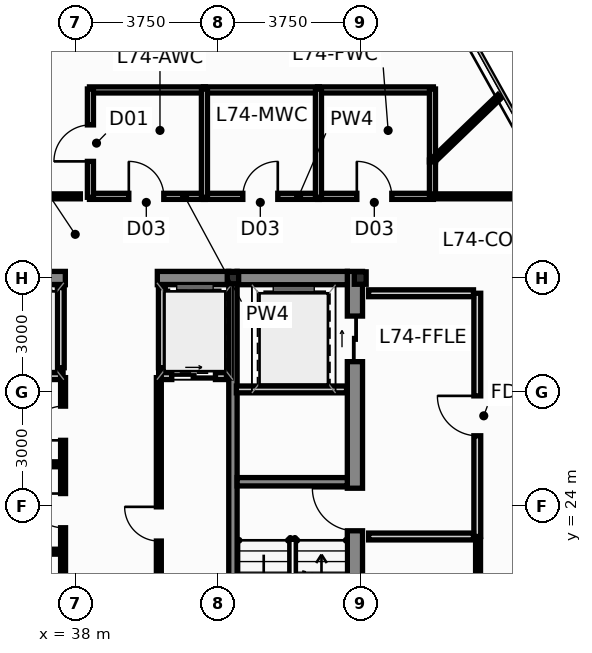
"""IFC4 building model, lengths in metres.
Left out: names, types, materials, properties, quantities, classifications, styles, units other than length and angle.
Written with IfcOpenShell. Run it as: python <this file> out.ifc"""

import sys

from ifc_helpers import new_model, si_unit, direction, frame, frame_2d, origin, origin_2d, place, context, subcontext, project, spatial, rectangle, hollow_rectangle, i_section, extrude, source, transform, mapped, element, fill, save


model = new_model("IFC4")
c1 = context("Model", 3, precision=1e-05, world=origin(), true_north=direction((0.0, 1.0)))
c2 = subcontext(c1, "Body", "Model", "MODEL_VIEW")
j1 = project(units=[si_unit("LENGTHUNIT", "METRE"), si_unit("PLANEANGLEUNIT", "RADIAN")], contexts=[c1])
p1 = place(None, origin())
s1 = spatial("IfcSite", under=j1, at=p1, CompositionType="ELEMENT")
p2 = place(p1, origin())
s2 = spatial("IfcBuilding", under=s1, at=p2, CompositionType="ELEMENT")
p3 = place(p2, frame((0.0, 0.0, 280.95)))
s3 = spatial("IfcBuildingStorey", under=s2, at=p3, CompositionType="ELEMENT", Elevation=280.95)
m1 = source(origin(), c2, "Body", "SweptSolid", [
    extrude(i_section(OverallWidth=0.311, OverallDepth=0.327, WebThickness=0.016, FlangeThickness=0.025, at=origin_2d()), origin(), (0.0, 0.0, 1.0), 3.65),
])
p4 = place(p3, frame((45.5, 30.0, 0.0), z_axis=(0.0, 0.0, 1.0), x_axis=(1.0, 0.0, 0.0)))
e1 = element("IfcColumn", 1, at=p4, inside=s3, PredefinedType="COLUMN", context=c2, shape_type="MappedRepresentation", body=[
    mapped(m1, transform((0.0, 0.0, 0.0), scale=1.0)),
])
m2 = source(origin(), c2, "Body", "SweptSolid", [
    extrude(hollow_rectangle(XDim=0.3, YDim=0.3, WallThickness=0.012, at=origin_2d()), origin(), (0.0, 0.0, 1.0), 3.65),
])
p5 = place(p3, frame((42.15, 30.0, 0.0), z_axis=(0.0, 0.0, 1.0), x_axis=(1.0, 0.0, 0.0)))
e2 = element("IfcColumn", 2, at=p5, inside=s3, PredefinedType="COLUMN", context=c2, shape_type="MappedRepresentation", body=[
    mapped(m2, transform((0.0, 0.0, 0.0), scale=1.0)),
])
p6 = place(p3, frame((45.36, 17.05, 0.0), z_axis=(0.0, 0.0, 1.0), x_axis=(0.0, 1.0, 0.0)))
e3 = element("IfcWall", 3, at=p6, inside=s3, PredefinedType="SHEAR", context=c2, shape_type="SweptSolid", body=[
    extrude(rectangle(XDim=13.125, YDim=0.4, at=frame_2d((6.562, 0.0))), origin(), (0.0, 0.0, 1.0), 3.65),
])
p7 = place(p6, frame((6.3, 0.0, 0.0)))
e4 = element("IfcOpeningElement", 4, at=p7, cuts=e3, PredefinedType="OPENING", context=c2, shape_type="SweptSolid", body=[
    extrude(rectangle(XDim=1.12, YDim=2.15, at=frame_2d((0.56, 1.075))), frame((0.0, 0.212, 0.0), z_axis=(0.0, -1.0, 0.0), x_axis=(1.0, 0.0, 0.0)), (0.0, 0.0, 1.0), 0.424),
])
p8 = place(p6, frame((10.75, 0.0, 0.0)))
e5 = element("IfcOpeningElement", 5, at=p8, cuts=e3, PredefinedType="OPENING", context=c2, shape_type="SweptSolid", body=[
    extrude(rectangle(XDim=1.2, YDim=2.2, at=frame_2d((0.6, 1.1))), frame((0.0, 0.212, 0.0), z_axis=(0.0, -1.0, 0.0), x_axis=(1.0, 0.0, 0.0)), (0.0, 0.0, 1.0), 0.424),
])
p9 = place(p3, frame((33.96, 30.0, 0.0), z_axis=(0.0, 0.0, 1.0), x_axis=(1.0, 0.0, 0.0)))
e6 = element("IfcWall", 6, at=p9, inside=s3, PredefinedType="SHEAR", context=c2, shape_type="SweptSolid", body=[
    extrude(rectangle(XDim=3.78, YDim=0.35, at=frame_2d((1.89, 0.0))), origin(), (0.0, 0.0, 1.0), 3.65),
])
p10 = place(p3, frame((40.16, 30.0, 0.0), z_axis=(0.0, 0.0, 1.0), x_axis=(1.0, 0.0, 0.0)))
e7 = element("IfcWall", 7, at=p10, inside=s3, PredefinedType="SHEAR", context=c2, shape_type="SweptSolid", body=[
    extrude(rectangle(XDim=1.88, YDim=0.35, at=frame_2d((0.94, 0.0))), origin(), (0.0, 0.0, 1.0), 3.65),
])
p11 = place(p3, frame((42.26, 30.0, 0.0), z_axis=(0.0, 0.0, 1.0), x_axis=(1.0, 0.0, 0.0)))
e8 = element("IfcWall", 8, at=p11, inside=s3, PredefinedType="SHEAR", context=c2, shape_type="SweptSolid", body=[
    extrude(rectangle(XDim=2.9, YDim=0.35, at=frame_2d((1.45, 0.0))), origin(), (0.0, 0.0, 1.0), 3.65),
])
p12 = place(p3, frame((42.15, 17.05, 0.0), z_axis=(0.0, 0.0, 1.0), x_axis=(0.0, 1.0, 0.0)))
e9 = element("IfcWall", 9, at=p12, inside=s3, PredefinedType="SHEAR", context=c2, shape_type="SweptSolid", body=[
    extrude(rectangle(XDim=13.125, YDim=0.22, at=frame_2d((6.562, 0.0))), origin(), (0.0, 0.0, 1.0), 3.65),
])
p13 = place(p3, frame((42.26, 24.64, 0.0), z_axis=(0.0, 0.0, 1.0), x_axis=(1.0, 0.0, 0.0)))
e10 = element("IfcWall", 10, at=p13, inside=s3, PredefinedType="SHEAR", context=c2, shape_type="SweptSolid", body=[
    extrude(rectangle(XDim=2.9, YDim=0.22, at=frame_2d((1.45, 0.0))), origin(), (0.0, 0.0, 1.0), 3.65),
])
p14 = place(p3, frame((34.02, 27.42, 0.0), z_axis=(0.0, 0.0, 1.0), x_axis=(1.0, 0.0, 0.0)))
e11 = element("IfcWall", 11, at=p14, inside=s3, PredefinedType="PARTITIONING", context=c2, shape_type="SweptSolid", body=[
    extrude(rectangle(XDim=3.66, YDim=0.18, at=frame_2d((1.83, 0.0))), origin(), (0.0, 0.0, 1.0), 3.25),
])
p15 = place(p14, frame((0.3, 0.0, 0.0)))
e12 = element("IfcOpeningElement", 12, at=p15, cuts=e11, PredefinedType="OPENING", context=c2, shape_type="SweptSolid", body=[
    extrude(rectangle(XDim=1.15, YDim=2.2, at=frame_2d((0.575, 1.1))), frame((0.0, 0.102, 0.0), z_axis=(0.0, -1.0, 0.0), x_axis=(1.0, 0.0, 0.0)), (0.0, 0.0, 1.0), 0.204),
])
p16 = place(p14, frame((2.1, 0.0, 0.0)))
e13 = element("IfcOpeningElement", 13, at=p16, cuts=e11, PredefinedType="OPENING", context=c2, shape_type="SweptSolid", body=[
    extrude(rectangle(XDim=1.15, YDim=2.2, at=frame_2d((0.575, 1.1))), frame((0.0, 0.102, 0.0), z_axis=(0.0, -1.0, 0.0), x_axis=(1.0, 0.0, 0.0)), (0.0, 0.0, 1.0), 0.204),
])
p17 = place(p3, frame((40.22, 27.42, 0.0), z_axis=(0.0, 0.0, 1.0), x_axis=(1.0, 0.0, 0.0)))
e14 = element("IfcWall", 14, at=p17, inside=s3, PredefinedType="PARTITIONING", context=c2, shape_type="SweptSolid", body=[
    extrude(rectangle(XDim=1.76, YDim=0.18, at=frame_2d((0.88, 0.0))), origin(), (0.0, 0.0, 1.0), 3.25),
])
p18 = place(p17, frame((0.32, 0.0, 0.0)))
e15 = element("IfcOpeningElement", 15, at=p18, cuts=e14, PredefinedType="OPENING", context=c2, shape_type="SweptSolid", body=[
    extrude(rectangle(XDim=1.15, YDim=2.2, at=frame_2d((0.575, 1.1))), frame((0.0, 0.102, 0.0), z_axis=(0.0, -1.0, 0.0), x_axis=(1.0, 0.0, 0.0)), (0.0, 0.0, 1.0), 0.204),
])
for number, where, z_axis, x_axis in (
    (16, (37.62, 27.64, 0.0), (0.0, 0.0, 1.0), (0.0, 1.0, 0.0)),
    (17, (40.28, 27.64, 0.0), (0.0, 0.0, 1.0), (0.0, 1.0, 0.0)),
):
    element("IfcWall", number, at=place(p3, frame(where, z_axis=z_axis, x_axis=x_axis)), inside=s3, PredefinedType="PARTITIONING", context=c2, shape_type="SweptSolid", body=[
        extrude(rectangle(XDim=2.11, YDim=0.18, at=frame_2d((1.055, 0.0))), origin(), (0.0, 0.0, 1.0), 3.25),
    ])
p19 = place(p3, frame((48.58, 23.2, 0.0), z_axis=(0.0, 0.0, 1.0), x_axis=(0.0, 1.0, 0.0)))
e18 = element("IfcWall", 18, at=p19, inside=s3, PredefinedType="PARTITIONING", context=c2, shape_type="SweptSolid", body=[
    extrude(rectangle(XDim=6.4, YDim=0.18, at=frame_2d((3.2, 0.0))), origin(), (0.0, 0.0, 1.0), 2.979),
])
p20 = place(p19, frame((2.65, 0.0, 0.0)))
e19 = element("IfcOpeningElement", 19, at=p20, cuts=e18, PredefinedType="OPENING", context=c2, shape_type="SweptSolid", body=[
    extrude(rectangle(XDim=1.05, YDim=2.15, at=frame_2d((0.525, 1.075))), frame((0.0, 0.102, 0.0), z_axis=(0.0, -1.0, 0.0), x_axis=(1.0, 0.0, 0.0)), (0.0, 0.0, 1.0), 0.204),
])
for number, where, z_axis, x_axis in (
    (20, (45.72, 23.2, 0.0), (0.0, 0.0, 1.0), (1.0, 0.0, 0.0)),
    (21, (45.72, 29.6, 0.0), (0.0, 0.0, 1.0), (1.0, 0.0, 0.0)),
):
    element("IfcWall", number, at=place(p3, frame(where, z_axis=z_axis, x_axis=x_axis)), inside=s3, PredefinedType="PARTITIONING", context=c2, shape_type="SweptSolid", body=[
        extrude(rectangle(XDim=2.76, YDim=0.18, at=frame_2d((1.38, 0.0))), origin(), (0.0, 0.0, 1.0), 3.25),
    ])
p21 = place(p3, frame((42.24, 27.07, 0.0), z_axis=(0.0, 0.0, 1.0), x_axis=(1.0, 0.0, 0.0)))
e22 = element("IfcWall", 22, at=p21, inside=s3, PredefinedType="PARTITIONING", context=c2, shape_type="SweptSolid", body=[
    extrude(rectangle(XDim=2.9, YDim=0.18, at=frame_2d((1.45, 0.0))), origin(), (0.0, 0.0, 1.0), 3.25),
])
for number, where, z_axis, x_axis in (
    (23, (34.02, 22.8, 0.0), (0.0, 0.0, 1.0), (1.0, 0.0, 0.0)),
    (24, (34.02, 25.1, 0.0), (0.0, 0.0, 1.0), (1.0, 0.0, 0.0)),
):
    element("IfcWall", number, at=place(p3, frame(where, z_axis=z_axis, x_axis=x_axis)), inside=s3, PredefinedType="PARTITIONING", context=c2, shape_type="SweptSolid", body=[
        extrude(rectangle(XDim=3.58, YDim=0.13, at=frame_2d((1.79, 0.0))), origin(), (0.0, 0.0, 1.0), 3.25),
    ])
p22 = place(p3, frame((37.68, 20.48, 0.0), z_axis=(0.0, 0.0, 1.0), x_axis=(0.0, 1.0, 0.0)))
e25 = element("IfcWall", 25, at=p22, inside=s3, PredefinedType="PARTITIONING", context=c2, shape_type="SweptSolid", body=[
    extrude(rectangle(XDim=6.9, YDim=0.13, at=frame_2d((3.45, 0.0))), origin(), (0.0, 0.0, 1.0), 3.25),
])
p23 = place(p22, frame((0.65, 0.0, 0.0)))
e26 = element("IfcOpeningElement", 26, at=p23, cuts=e25, PredefinedType="OPENING", context=c2, shape_type="SweptSolid", body=[
    extrude(rectangle(XDim=0.9, YDim=2.1, at=frame_2d((0.45, 1.05))), frame((0.0, 0.077, 0.0), z_axis=(0.0, -1.0, 0.0), x_axis=(1.0, 0.0, 0.0)), (0.0, 0.0, 1.0), 0.154),
])
p24 = place(p22, frame((2.95, 0.0, 0.0)))
e27 = element("IfcOpeningElement", 27, at=p24, cuts=e25, PredefinedType="OPENING", context=c2, shape_type="SweptSolid", body=[
    extrude(rectangle(XDim=0.9, YDim=2.1, at=frame_2d((0.45, 1.05))), frame((0.0, 0.077, 0.0), z_axis=(0.0, -1.0, 0.0), x_axis=(1.0, 0.0, 0.0)), (0.0, 0.0, 1.0), 0.154),
])
p25 = place(p22, frame((5.25, 0.0, 0.0)))
e28 = element("IfcOpeningElement", 28, at=p25, cuts=e25, PredefinedType="OPENING", context=c2, shape_type="SweptSolid", body=[
    extrude(rectangle(XDim=0.9, YDim=2.1, at=frame_2d((0.45, 1.05))), frame((0.0, 0.077, 0.0), z_axis=(0.0, -1.0, 0.0), x_axis=(1.0, 0.0, 0.0)), (0.0, 0.0, 1.0), 0.154),
])
p26 = place(p3, frame((40.2, 20.48, 0.0), z_axis=(0.0, 0.0, 1.0), x_axis=(0.0, 1.0, 0.0)))
e29 = element("IfcWall", 29, at=p26, inside=s3, PredefinedType="PARTITIONING", context=c2, shape_type="SweptSolid", body=[
    extrude(rectangle(XDim=6.9, YDim=0.13, at=frame_2d((3.45, 0.0))), origin(), (0.0, 0.0, 1.0), 3.25),
])
p27 = place(p26, frame((2.6, 0.0, 0.0)))
e30 = element("IfcOpeningElement", 30, at=p27, cuts=e29, PredefinedType="OPENING", context=c2, shape_type="SweptSolid", body=[
    extrude(rectangle(XDim=0.9, YDim=2.1, at=frame_2d((0.45, 1.05))), frame((0.0, 0.077, 0.0), z_axis=(0.0, -1.0, 0.0), x_axis=(1.0, 0.0, 0.0)), (0.0, 0.0, 1.0), 0.154),
])
p28 = place(p3, frame((38.375, 32.15, 0.0), z_axis=(0.0, 0.0, 1.0), x_axis=(1.0, 0.0, 0.0)))
e31 = element("IfcWall", 31, at=p28, inside=s3, PredefinedType="PLUMBINGWALL", context=c2, shape_type="SweptSolid", body=[
    extrude(rectangle(XDim=3.05, YDim=0.16, at=frame_2d((1.525, 0.0))), origin(), (0.0, 0.0, 1.0), 3.25),
])
p29 = place(p28, frame((1.035, 0.0, 0.0)))
e32 = element("IfcOpeningElement", 32, at=p29, cuts=e31, PredefinedType="OPENING", context=c2, shape_type="SweptSolid", body=[
    extrude(rectangle(XDim=0.92, YDim=2.1, at=frame_2d((0.46, 1.05))), frame((0.0, 0.092, 0.0), z_axis=(0.0, -1.0, 0.0), x_axis=(1.0, 0.0, 0.0)), (0.0, 0.0, 1.0), 0.184),
])
p30 = place(p3, frame((41.375, 32.15, 0.0), z_axis=(0.0, 0.0, 1.0), x_axis=(1.0, 0.0, 0.0)))
e33 = element("IfcWall", 33, at=p30, inside=s3, PredefinedType="PLUMBINGWALL", context=c2, shape_type="SweptSolid", body=[
    extrude(rectangle(XDim=3.05, YDim=0.16, at=frame_2d((1.525, 0.0))), origin(), (0.0, 0.0, 1.0), 3.25),
])
p31 = place(p30, frame((1.035, 0.0, 0.0)))
e34 = element("IfcOpeningElement", 34, at=p31, cuts=e33, PredefinedType="OPENING", context=c2, shape_type="SweptSolid", body=[
    extrude(rectangle(XDim=0.92, YDim=2.1, at=frame_2d((0.46, 1.05))), frame((0.0, 0.092, 0.0), z_axis=(0.0, -1.0, 0.0), x_axis=(1.0, 0.0, 0.0)), (0.0, 0.0, 1.0), 0.184),
])
p32 = place(p3, frame((44.375, 32.15, 0.0), z_axis=(0.0, 0.0, 1.0), x_axis=(1.0, 0.0, 0.0)))
e35 = element("IfcWall", 35, at=p32, inside=s3, PredefinedType="PLUMBINGWALL", context=c2, shape_type="SweptSolid", body=[
    extrude(rectangle(XDim=3.05, YDim=0.16, at=frame_2d((1.525, 0.0))), origin(), (0.0, 0.0, 1.0), 3.25),
])
p33 = place(p32, frame((1.035, 0.0, 0.0)))
e36 = element("IfcOpeningElement", 36, at=p33, cuts=e35, PredefinedType="OPENING", context=c2, shape_type="SweptSolid", body=[
    extrude(rectangle(XDim=0.92, YDim=2.1, at=frame_2d((0.46, 1.05))), frame((0.0, 0.092, 0.0), z_axis=(0.0, -1.0, 0.0), x_axis=(1.0, 0.0, 0.0)), (0.0, 0.0, 1.0), 0.184),
])
for number, where, z_axis, x_axis in (
    (37, (38.375, 34.95, 0.0), (0.0, 0.0, 1.0), (1.0, 0.0, 0.0)),
    (38, (41.375, 34.95, 0.0), (0.0, 0.0, 1.0), (1.0, 0.0, 0.0)),
    (39, (47.425, 34.95, 0.0), (0.0, 0.0, 1.0), (-1.0, 0.0, 0.0)),
):
    element("IfcWall", number, at=place(p3, frame(where, z_axis=z_axis, x_axis=x_axis)), inside=s3, PredefinedType="PLUMBINGWALL", context=c2, shape_type="SweptSolid", body=[
        extrude(rectangle(XDim=3.05, YDim=0.16, at=frame_2d((1.525, 0.0))), origin(), (0.0, 0.0, 1.0), 3.25),
    ])
p34 = place(p3, frame((41.4, 32.125, 0.0), z_axis=(0.0, 0.0, 1.0), x_axis=(0.0, 1.0, 0.0)))
e40 = element("IfcWall", 40, at=p34, inside=s3, PredefinedType="PLUMBINGWALL", context=c2, shape_type="SweptSolid", body=[
    extrude(rectangle(XDim=2.85, YDim=0.16, at=frame_2d((1.425, 0.0))), origin(), (0.0, 0.0, 1.0), 3.25),
])
p35 = place(p3, frame((38.4, 32.125, 0.0), z_axis=(0.0, 0.0, 1.0), x_axis=(0.0, 1.0, 0.0)))
e41 = element("IfcWall", 41, at=p35, inside=s3, PredefinedType="PLUMBINGWALL", context=c2, shape_type="SweptSolid", body=[
    extrude(rectangle(XDim=2.85, YDim=0.16, at=frame_2d((1.425, 0.0))), origin(), (0.0, 0.0, 1.0), 3.25),
])
p36 = place(p35, frame((0.945, 0.0, 0.0)))
e42 = element("IfcOpeningElement", 42, at=p36, cuts=e41, PredefinedType="OPENING", context=c2, shape_type="SweptSolid", body=[
    extrude(rectangle(XDim=0.96, YDim=2.15, at=frame_2d((0.48, 1.075))), frame((0.0, 0.092, 0.0), z_axis=(0.0, -1.0, 0.0), x_axis=(1.0, 0.0, 0.0)), (0.0, 0.0, 1.0), 0.184),
])
p37 = place(p3, frame((44.4, 32.125, 0.0), z_axis=(0.0, 0.0, 1.0), x_axis=(0.0, 1.0, 0.0)))
e43 = element("IfcWall", 43, at=p37, inside=s3, PredefinedType="PLUMBINGWALL", context=c2, shape_type="SweptSolid", body=[
    extrude(rectangle(XDim=2.85, YDim=0.16, at=frame_2d((1.425, 0.0))), origin(), (0.0, 0.0, 1.0), 2.835),
])
p38 = place(p3, frame((47.4, 33.055, 0.0), z_axis=(0.0, 0.0, 1.0), x_axis=(0.0, 1.0, 0.0)))
e44 = element("IfcWall", 44, at=p38, inside=s3, PredefinedType="PLUMBINGWALL", context=c2, shape_type="SweptSolid", body=[
    extrude(rectangle(XDim=1.92, YDim=0.16, at=frame_2d((0.96, 0.0))), origin(), (0.0, 0.0, 1.0), 3.25),
])
p39 = place(p3, frame((47.4, 32.125, 0.0), z_axis=(0.0, 0.0, 1.0), x_axis=(0.0, 1.0, 0.0)))
e45 = element("IfcWall", 45, at=p39, inside=s3, PredefinedType="PLUMBINGWALL", context=c2, shape_type="SweptSolid", body=[
    extrude(rectangle(XDim=0.98, YDim=0.16, at=frame_2d((0.49, 0.0))), origin(), (0.0, 0.0, 1.0), 3.25),
])
p40 = place(p3, frame((30.135, 32.15, 0.0), z_axis=(0.0, 0.0, 1.0), x_axis=(1.0, 0.0, 0.0)))
e46 = element("IfcWall", 46, at=p40, inside=s3, PredefinedType="PARTITIONING", context=c2, shape_type="SweptSolid", body=[
    extrude(rectangle(XDim=8.0, YDim=0.13, at=frame_2d((4.0, 0.0))), origin(), (0.0, 0.0, 1.0), 3.25),
])
p41 = place(p40, frame((3.52, 0.0, 0.0)))
e47 = element("IfcOpeningElement", 47, at=p41, cuts=e46, PredefinedType="OPENING", context=c2, shape_type="SweptSolid", body=[
    extrude(rectangle(XDim=0.96, YDim=2.15, at=frame_2d((0.48, 1.075))), frame((0.0, 0.077, 0.0), z_axis=(0.0, -1.0, 0.0), x_axis=(1.0, 0.0, 0.0)), (0.0, 0.0, 1.0), 0.154),
])
p42 = place(p3, frame((48.6, 17.105, 0.0), z_axis=(0.0, 0.0, 1.0), x_axis=(0.0, 1.0, 0.0)))
e48 = element("IfcWall", 48, at=p42, inside=s3, PredefinedType="PARTITIONING", context=c2, shape_type="SweptSolid", body=[
    extrude(rectangle(XDim=6.0, YDim=0.13, at=frame_2d((3.0, 0.0))), origin(), (0.0, 0.0, 1.0), 2.979),
])
p43 = place(p42, frame((2.52, 0.0, 0.0)))
e49 = element("IfcOpeningElement", 49, at=p43, cuts=e48, PredefinedType="OPENING", context=c2, shape_type="SweptSolid", body=[
    extrude(rectangle(XDim=0.96, YDim=2.15, at=frame_2d((0.48, 1.075))), frame((0.0, 0.077, 0.0), z_axis=(0.0, -1.0, 0.0), x_axis=(1.0, 0.0, 0.0)), (0.0, 0.0, 1.0), 0.154),
])
p44 = place(p3, frame((50.612, 32.15, 0.0), z_axis=(0.0, 0.0, 1.0), x_axis=(-1.0, 0.0, 0.0)))
e50 = element("IfcWall", 50, at=p44, inside=s3, PredefinedType="PARTITIONING", context=c2, shape_type="SweptSolid", body=[
    extrude(rectangle(XDim=3.207, YDim=0.13, at=frame_2d((1.604, 0.0))), origin(), (0.0, 0.0, 1.0), 3.25),
])
p45 = place(p3, frame((47.404, 33.083, 0.0), z_axis=(0.0, 0.0, 1.0), x_axis=(0.720486230729, 0.693469243247, 0.0)))
e51 = element("IfcWall", 51, at=p45, inside=s3, PredefinedType="PARTITIONING", context=c2, shape_type="SweptSolid", body=[
    extrude(rectangle(XDim=2.449, YDim=0.13, at=frame_2d((1.225, 0.0))), origin(), (0.0, 0.0, 1.0), 3.25),
])
p46 = place(p7, origin())
e52 = element("IfcDoor", 52, at=p46, inside=s3, OperationType="SINGLE_SWING_RIGHT", PredefinedType="DOOR", context=c2, shape_type="SweptSolid", body=[
    extrude(rectangle(XDim=1.12, YDim=2.15, at=frame_2d((0.56, 1.075))), frame((0.0, 0.025, 0.0), z_axis=(0.0, -1.0, 0.0), x_axis=(1.0, 0.0, 0.0)), (0.0, 0.0, 1.0), 0.05),
])
fill(e4, e52)
p47 = place(p8, origin())
e53 = element("IfcDoor", 53, at=p47, inside=s3, OperationType="SLIDING_TO_RIGHT", PredefinedType="DOOR", context=c2, shape_type="SweptSolid", body=[
    extrude(rectangle(XDim=1.2, YDim=2.2, at=frame_2d((0.6, 1.1))), frame((0.0, 0.025, 0.0), z_axis=(0.0, -1.0, 0.0), x_axis=(1.0, 0.0, 0.0)), (0.0, 0.0, 1.0), 0.05),
])
fill(e5, e53)
p48 = place(p18, origin())
e54 = element("IfcDoor", 54, at=p48, inside=s3, OperationType="SLIDING_TO_RIGHT", PredefinedType="DOOR", context=c2, shape_type="SweptSolid", body=[
    extrude(rectangle(XDim=1.15, YDim=2.2, at=frame_2d((0.575, 1.1))), frame((0.0, 0.025, 0.0), z_axis=(0.0, -1.0, 0.0), x_axis=(1.0, 0.0, 0.0)), (0.0, 0.0, 1.0), 0.05),
])
fill(e15, e54)
p49 = place(p20, origin())
e55 = element("IfcDoor", 55, at=p49, inside=s3, OperationType="SINGLE_SWING_RIGHT", PredefinedType="DOOR", context=c2, shape_type="SweptSolid", body=[
    extrude(rectangle(XDim=1.05, YDim=2.15, at=frame_2d((0.525, 1.075))), frame((0.0, 0.025, 0.0), z_axis=(0.0, -1.0, 0.0), x_axis=(1.0, 0.0, 0.0)), (0.0, 0.0, 1.0), 0.05),
])
fill(e19, e55)
p50 = place(p24, origin())
e56 = element("IfcDoor", 56, at=p50, inside=s3, OperationType="SINGLE_SWING_RIGHT", PredefinedType="DOOR", context=c2, shape_type="SweptSolid", body=[
    extrude(rectangle(XDim=0.9, YDim=2.1, at=frame_2d((0.45, 1.05))), frame((0.0, 0.025, 0.0), z_axis=(0.0, -1.0, 0.0), x_axis=(1.0, 0.0, 0.0)), (0.0, 0.0, 1.0), 0.05),
])
fill(e27, e56)
p51 = place(p25, origin())
e57 = element("IfcDoor", 57, at=p51, inside=s3, OperationType="SINGLE_SWING_LEFT", PredefinedType="DOOR", context=c2, shape_type="SweptSolid", body=[
    extrude(rectangle(XDim=0.9, YDim=2.1, at=frame_2d((0.45, 1.05))), frame((0.0, 0.025, 0.0), z_axis=(0.0, -1.0, 0.0), x_axis=(1.0, 0.0, 0.0)), (0.0, 0.0, 1.0), 0.05),
])
fill(e28, e57)
p52 = place(p27, origin())
e58 = element("IfcDoor", 58, at=p52, inside=s3, OperationType="SINGLE_SWING_RIGHT", PredefinedType="DOOR", context=c2, shape_type="SweptSolid", body=[
    extrude(rectangle(XDim=0.9, YDim=2.1, at=frame_2d((0.45, 1.05))), frame((0.0, 0.025, 0.0), z_axis=(0.0, -1.0, 0.0), x_axis=(1.0, 0.0, 0.0)), (0.0, 0.0, 1.0), 0.05),
])
fill(e30, e58)
p53 = place(p29, origin())
e59 = element("IfcDoor", 59, at=p53, inside=s3, OperationType="SINGLE_SWING_LEFT", PredefinedType="DOOR", context=c2, shape_type="SweptSolid", body=[
    extrude(rectangle(XDim=0.92, YDim=2.1, at=frame_2d((0.46, 1.05))), frame((0.0, 0.025, 0.0), z_axis=(0.0, -1.0, 0.0), x_axis=(1.0, 0.0, 0.0)), (0.0, 0.0, 1.0), 0.05),
])
fill(e32, e59)
p54 = place(p31, origin())
e60 = element("IfcDoor", 60, at=p54, inside=s3, OperationType="SINGLE_SWING_RIGHT", PredefinedType="DOOR", context=c2, shape_type="SweptSolid", body=[
    extrude(rectangle(XDim=0.92, YDim=2.1, at=frame_2d((0.46, 1.05))), frame((0.0, 0.025, 0.0), z_axis=(0.0, -1.0, 0.0), x_axis=(1.0, 0.0, 0.0)), (0.0, 0.0, 1.0), 0.05),
])
fill(e34, e60)
p55 = place(p33, origin())
e61 = element("IfcDoor", 61, at=p55, inside=s3, OperationType="SINGLE_SWING_LEFT", PredefinedType="DOOR", context=c2, shape_type="SweptSolid", body=[
    extrude(rectangle(XDim=0.92, YDim=2.1, at=frame_2d((0.46, 1.05))), frame((0.0, 0.025, 0.0), z_axis=(0.0, -1.0, 0.0), x_axis=(1.0, 0.0, 0.0)), (0.0, 0.0, 1.0), 0.05),
])
fill(e36, e61)
p56 = place(p36, origin())
e62 = element("IfcDoor", 62, at=p56, inside=s3, OperationType="SINGLE_SWING_LEFT", PredefinedType="DOOR", context=c2, shape_type="SweptSolid", body=[
    extrude(rectangle(XDim=0.96, YDim=2.15, at=frame_2d((0.48, 1.075))), frame((0.0, 0.025, 0.0), z_axis=(0.0, -1.0, 0.0), x_axis=(1.0, 0.0, 0.0)), (0.0, 0.0, 1.0), 0.05),
])
fill(e42, e62)
save(model, sys.argv[1])
